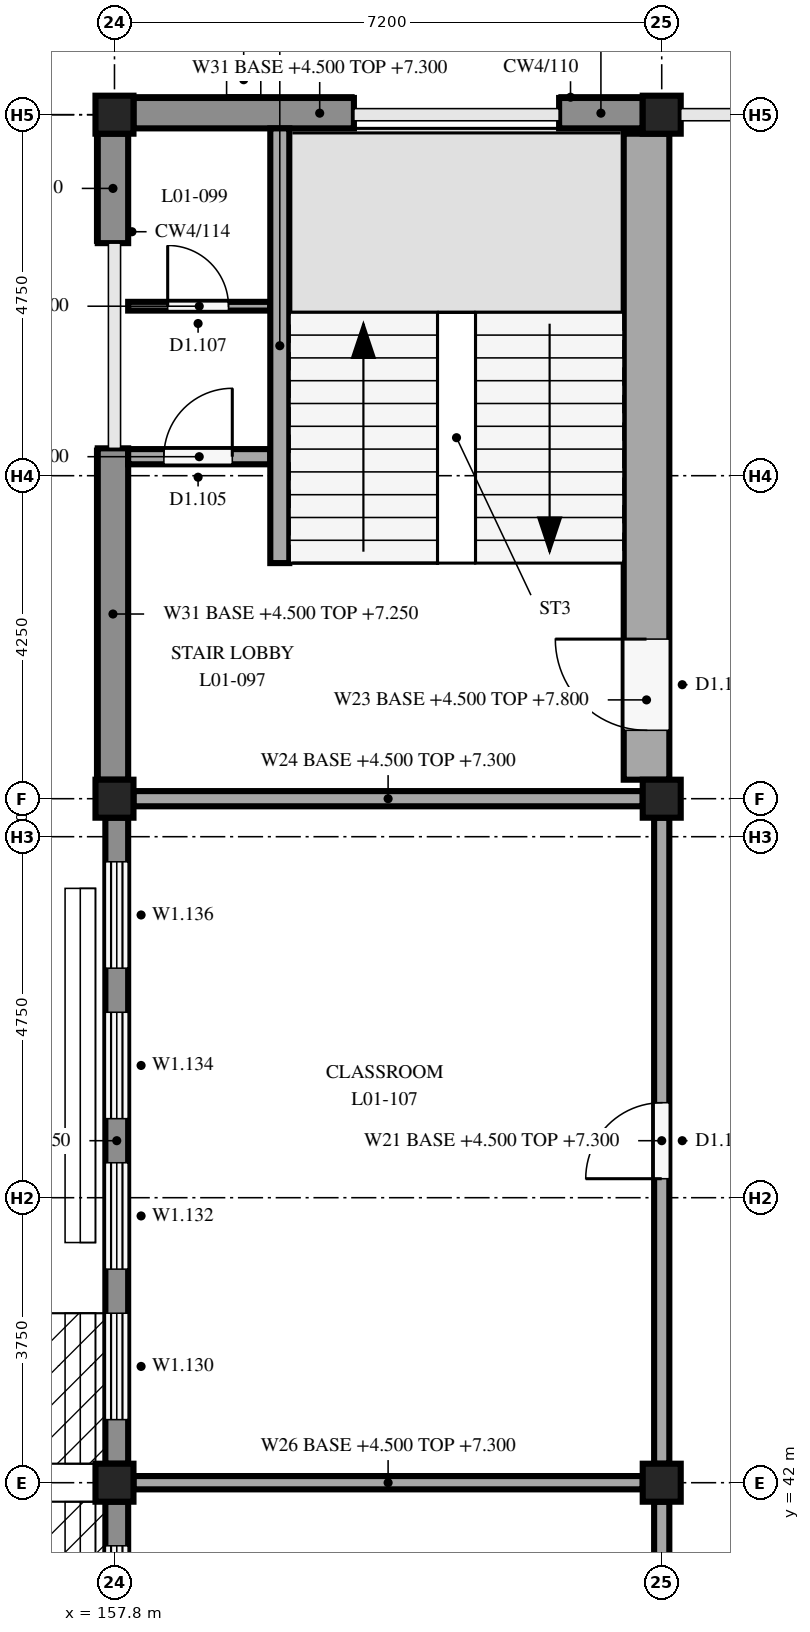
"""IFC4 building model, lengths in metres.
Left out: names, types, materials, properties, quantities, classifications, styles, units other than length and angle.
Written with IfcOpenShell. Run it as: python <this file> out.ifc"""

import sys

from ifc_helpers import new_model, si_unit, direction, frame, frame_2d, origin, origin_2d, place, context, subcontext, project, spatial, rectangle, extrude, element, fill, save


model = new_model("IFC4")
c1 = context("Model", 3, precision=1e-05, world=origin(), true_north=direction((0.0, 1.0)))
c2 = subcontext(c1, "Body", "Model", "MODEL_VIEW")
j1 = project(units=[si_unit("LENGTHUNIT", "METRE"), si_unit("PLANEANGLEUNIT", "RADIAN")], contexts=[c1])
p1 = place(None, origin())
s1 = spatial("IfcSite", under=j1, at=p1, CompositionType="ELEMENT")
p2 = place(p1, origin())
s2 = spatial("IfcBuilding", under=s1, at=p2, CompositionType="ELEMENT")
p3 = place(p2, frame((0.0, 0.0, 4.5)))
s3 = spatial("IfcBuildingStorey", under=s2, at=p3, CompositionType="ELEMENT", Elevation=4.5)
for number, where, z_axis, x_axis in (
    (1, (157.8, 42.0, 0.0), (0.0, 0.0, 1.0), (1.0, 0.0, 0.0)),
    (2, (157.8, 51.0, 0.0), (0.0, 0.0, 1.0), (1.0, 0.0, 0.0)),
    (3, (157.8, 60.0, 0.0), (0.0, 0.0, 1.0), (1.0, 0.0, 0.0)),
    (4, (165.0, 42.0, 0.0), (0.0, 0.0, 1.0), (1.0, 0.0, 0.0)),
    (5, (165.0, 51.0, 0.0), (0.0, 0.0, 1.0), (1.0, 0.0, 0.0)),
    (6, (165.0, 60.0, 0.0), (0.0, 0.0, 1.0), (1.0, 0.0, 0.0)),
):
    element("IfcColumn", number, at=place(p3, frame(where, z_axis=z_axis, x_axis=x_axis)), inside=s3, PredefinedType="COLUMN", context=c2, shape_type="SweptSolid", body=[
        extrude(rectangle(XDim=0.5, YDim=0.5, at=origin_2d()), origin(), (0.0, 0.0, 1.0), 3.3),
    ])
p4 = place(p3, frame((157.83, 33.25, 0.0), z_axis=(0.0, 0.0, 1.0), x_axis=(0.0, 1.0, 0.0)))
e7 = element("IfcWall", 7, at=p4, inside=s3, PredefinedType="STANDARD", context=c2, shape_type="SweptSolid", body=[
    extrude(rectangle(XDim=8.5, YDim=0.3, at=frame_2d((4.25, 0.0))), origin(), (0.0, 0.0, 1.0), 2.75),
])
p5 = place(p4, frame((0.58, 0.0, 0.6)))
e8 = element("IfcOpeningElement", 8, at=p5, cuts=e7, PredefinedType="OPENING", context=c2, shape_type="SweptSolid", body=[
    extrude(rectangle(XDim=1.4, YDim=2.1, at=frame_2d((0.7, 1.05))), frame((0.0, 0.16, 0.0), z_axis=(0.0, -1.0, 0.0), x_axis=(1.0, 0.0, 0.0)), (0.0, 0.0, 1.0), 0.32),
])
p6 = place(p4, frame((2.56, 0.0, 0.6)))
e9 = element("IfcOpeningElement", 9, at=p6, cuts=e7, PredefinedType="OPENING", context=c2, shape_type="SweptSolid", body=[
    extrude(rectangle(XDim=1.4, YDim=2.1, at=frame_2d((0.7, 1.05))), frame((0.0, 0.16, 0.0), z_axis=(0.0, -1.0, 0.0), x_axis=(1.0, 0.0, 0.0)), (0.0, 0.0, 1.0), 0.32),
])
p7 = place(p4, frame((4.54, 0.0, 0.6)))
e10 = element("IfcOpeningElement", 10, at=p7, cuts=e7, PredefinedType="OPENING", context=c2, shape_type="SweptSolid", body=[
    extrude(rectangle(XDim=1.4, YDim=2.1, at=frame_2d((0.7, 1.05))), frame((0.0, 0.16, 0.0), z_axis=(0.0, -1.0, 0.0), x_axis=(1.0, 0.0, 0.0)), (0.0, 0.0, 1.0), 0.32),
])
p8 = place(p4, frame((6.52, 0.0, 0.6)))
e11 = element("IfcOpeningElement", 11, at=p8, cuts=e7, PredefinedType="OPENING", context=c2, shape_type="SweptSolid", body=[
    extrude(rectangle(XDim=1.4, YDim=2.1, at=frame_2d((0.7, 1.05))), frame((0.0, 0.16, 0.0), z_axis=(0.0, -1.0, 0.0), x_axis=(1.0, 0.0, 0.0)), (0.0, 0.0, 1.0), 0.32),
])
p9 = place(p3, frame((157.83, 42.25, 0.0), z_axis=(0.0, 0.0, 1.0), x_axis=(0.0, 1.0, 0.0)))
e12 = element("IfcWall", 12, at=p9, inside=s3, PredefinedType="STANDARD", context=c2, shape_type="SweptSolid", body=[
    extrude(rectangle(XDim=8.5, YDim=0.3, at=frame_2d((4.25, 0.0))), origin(), (0.0, 0.0, 1.0), 2.75),
])
p10 = place(p9, frame((0.58, 0.0, 0.6)))
e13 = element("IfcOpeningElement", 13, at=p10, cuts=e12, PredefinedType="OPENING", context=c2, shape_type="SweptSolid", body=[
    extrude(rectangle(XDim=1.4, YDim=2.1, at=frame_2d((0.7, 1.05))), frame((0.0, 0.16, 0.0), z_axis=(0.0, -1.0, 0.0), x_axis=(1.0, 0.0, 0.0)), (0.0, 0.0, 1.0), 0.32),
])
p11 = place(p9, frame((2.56, 0.0, 0.6)))
e14 = element("IfcOpeningElement", 14, at=p11, cuts=e12, PredefinedType="OPENING", context=c2, shape_type="SweptSolid", body=[
    extrude(rectangle(XDim=1.4, YDim=2.1, at=frame_2d((0.7, 1.05))), frame((0.0, 0.16, 0.0), z_axis=(0.0, -1.0, 0.0), x_axis=(1.0, 0.0, 0.0)), (0.0, 0.0, 1.0), 0.32),
])
p12 = place(p9, frame((4.54, 0.0, 0.6)))
e15 = element("IfcOpeningElement", 15, at=p12, cuts=e12, PredefinedType="OPENING", context=c2, shape_type="SweptSolid", body=[
    extrude(rectangle(XDim=1.4, YDim=2.1, at=frame_2d((0.7, 1.05))), frame((0.0, 0.16, 0.0), z_axis=(0.0, -1.0, 0.0), x_axis=(1.0, 0.0, 0.0)), (0.0, 0.0, 1.0), 0.32),
])
p13 = place(p9, frame((6.52, 0.0, 0.6)))
e16 = element("IfcOpeningElement", 16, at=p13, cuts=e12, PredefinedType="OPENING", context=c2, shape_type="SweptSolid", body=[
    extrude(rectangle(XDim=1.4, YDim=2.1, at=frame_2d((0.7, 1.05))), frame((0.0, 0.16, 0.0), z_axis=(0.0, -1.0, 0.0), x_axis=(1.0, 0.0, 0.0)), (0.0, 0.0, 1.0), 0.32),
])
p14 = place(p3, frame((157.78, 51.25, 0.0), z_axis=(0.0, 0.0, 1.0), x_axis=(0.0, 1.0, 0.0)))
e17 = element("IfcWall", 17, at=p14, inside=s3, PredefinedType="STANDARD", context=c2, shape_type="SweptSolid", body=[
    extrude(rectangle(XDim=4.36, YDim=0.4, at=frame_2d((2.18, 0.0))), origin(), (0.0, 0.0, 1.0), 2.75),
])
p15 = place(p3, frame((157.78, 58.31, 0.0), z_axis=(0.0, 0.0, 1.0), x_axis=(0.0, 1.0, 0.0)))
e18 = element("IfcWall", 18, at=p15, inside=s3, PredefinedType="STANDARD", context=c2, shape_type="SweptSolid", body=[
    extrude(rectangle(XDim=1.44, YDim=0.4, at=frame_2d((0.72, 0.0))), origin(), (0.0, 0.0, 1.0), 2.75),
])
p16 = place(p3, frame((158.05, 60.02, 0.0), z_axis=(0.0, 0.0, 1.0), x_axis=(1.0, 0.0, 0.0)))
e19 = element("IfcWall", 19, at=p16, inside=s3, PredefinedType="STANDARD", context=c2, shape_type="SweptSolid", body=[
    extrude(rectangle(XDim=2.9, YDim=0.4, at=frame_2d((1.45, 0.0))), origin(), (0.0, 0.0, 1.0), 2.8),
])
p17 = place(p3, frame((163.65, 60.02, 0.0), z_axis=(0.0, 0.0, 1.0), x_axis=(1.0, 0.0, 0.0)))
e20 = element("IfcWall", 20, at=p17, inside=s3, PredefinedType="STANDARD", context=c2, shape_type="SweptSolid", body=[
    extrude(rectangle(XDim=1.1, YDim=0.4, at=frame_2d((0.55, 0.0))), origin(), (0.0, 0.0, 1.0), 2.8),
])
p18 = place(p3, frame((159.975, 54.1, 0.0), z_axis=(0.0, 0.0, 1.0), x_axis=(0.0, 1.0, 0.0)))
e21 = element("IfcWall", 21, at=p18, inside=s3, PredefinedType="SOLIDWALL", context=c2, shape_type="SweptSolid", body=[
    extrude(rectangle(XDim=5.72, YDim=0.25, at=frame_2d((2.86, 0.0))), origin(), (0.0, 0.0, 1.0), 3.3),
])
p19 = place(p3, frame((164.8, 51.25, 0.0), z_axis=(0.0, 0.0, 1.0), x_axis=(0.0, 1.0, 0.0)))
e22 = element("IfcWall", 22, at=p19, inside=s3, PredefinedType="SOLIDWALL", context=c2, shape_type="SweptSolid", body=[
    extrude(rectangle(XDim=8.5, YDim=0.6, at=frame_2d((4.25, 0.0))), origin(), (0.0, 0.0, 1.0), 3.3),
])
p20 = place(p19, frame((0.65, 0.0, 0.0)))
e23 = element("IfcOpeningElement", 23, at=p20, cuts=e22, PredefinedType="OPENING", context=c2, shape_type="SweptSolid", body=[
    extrude(rectangle(XDim=1.2, YDim=2.1, at=frame_2d((0.6, 1.05))), frame((0.0, 0.31, 0.0), z_axis=(0.0, -1.0, 0.0), x_axis=(1.0, 0.0, 0.0)), (0.0, 0.0, 1.0), 0.62),
])
p21 = place(p3, frame((157.98, 55.5, 0.0), z_axis=(0.0, 0.0, 1.0), x_axis=(1.0, 0.0, 0.0)))
e24 = element("IfcWall", 24, at=p21, inside=s3, PredefinedType="SOLIDWALL", context=c2, shape_type="SweptSolid", body=[
    extrude(rectangle(XDim=1.87, YDim=0.2, at=frame_2d((0.935, 0.0))), origin(), (0.0, 0.0, 1.0), 3.3),
])
p22 = place(p21, frame((0.47, 0.0, 0.0)))
e25 = element("IfcOpeningElement", 25, at=p22, cuts=e24, PredefinedType="OPENING", context=c2, shape_type="SweptSolid", body=[
    extrude(rectangle(XDim=0.9, YDim=2.1, at=frame_2d((0.45, 1.05))), frame((0.0, 0.11, 0.0), z_axis=(0.0, -1.0, 0.0), x_axis=(1.0, 0.0, 0.0)), (0.0, 0.0, 1.0), 0.22),
])
p23 = place(p3, frame((157.98, 57.48, 0.0), z_axis=(0.0, 0.0, 1.0), x_axis=(1.0, 0.0, 0.0)))
e26 = element("IfcWall", 26, at=p23, inside=s3, PredefinedType="PARTITIONING", context=c2, shape_type="SweptSolid", body=[
    extrude(rectangle(XDim=1.87, YDim=0.115, at=frame_2d((0.935, 0.0))), origin(), (0.0, 0.0, 1.0), 3.3),
])
p24 = place(p23, frame((0.52, 0.0, 0.0)))
e27 = element("IfcOpeningElement", 27, at=p24, cuts=e26, PredefinedType="OPENING", context=c2, shape_type="SweptSolid", body=[
    extrude(rectangle(XDim=0.8, YDim=2.1, at=frame_2d((0.4, 1.05))), frame((0.0, 0.067, 0.0), z_axis=(0.0, -1.0, 0.0), x_axis=(1.0, 0.0, 0.0)), (0.0, 0.0, 1.0), 0.135),
])
p25 = place(p3, frame((158.05, 51.0, 0.0), z_axis=(0.0, 0.0, 1.0), x_axis=(1.0, 0.0, 0.0)))
e28 = element("IfcWall", 28, at=p25, inside=s3, PredefinedType="SOLIDWALL", context=c2, shape_type="SweptSolid", body=[
    extrude(rectangle(XDim=6.7, YDim=0.2, at=frame_2d((3.35, 0.0))), origin(), (0.0, 0.0, 1.0), 2.8),
])
p26 = place(p3, frame((165.0, 33.25, 0.0), z_axis=(0.0, 0.0, 1.0), x_axis=(0.0, 1.0, 0.0)))
e29 = element("IfcWall", 29, at=p26, inside=s3, PredefinedType="PARTITIONING", context=c2, shape_type="SweptSolid", body=[
    extrude(rectangle(XDim=8.5, YDim=0.2, at=frame_2d((4.25, 0.0))), origin(), (0.0, 0.0, 1.0), 2.8),
])
p27 = place(p26, frame((3.75, 0.0, 0.0)))
e30 = element("IfcOpeningElement", 30, at=p27, cuts=e29, PredefinedType="OPENING", context=c2, shape_type="SweptSolid", body=[
    extrude(rectangle(XDim=1.0, YDim=2.1, at=frame_2d((0.5, 1.05))), frame((0.0, 0.11, 0.0), z_axis=(0.0, -1.0, 0.0), x_axis=(1.0, 0.0, 0.0)), (0.0, 0.0, 1.0), 0.22),
])
p28 = place(p3, frame((165.0, 42.25, 0.0), z_axis=(0.0, 0.0, 1.0), x_axis=(0.0, 1.0, 0.0)))
e31 = element("IfcWall", 31, at=p28, inside=s3, PredefinedType="PARTITIONING", context=c2, shape_type="SweptSolid", body=[
    extrude(rectangle(XDim=8.5, YDim=0.2, at=frame_2d((4.25, 0.0))), origin(), (0.0, 0.0, 1.0), 2.8),
])
p29 = place(p28, frame((3.75, 0.0, 0.0)))
e32 = element("IfcOpeningElement", 32, at=p29, cuts=e31, PredefinedType="OPENING", context=c2, shape_type="SweptSolid", body=[
    extrude(rectangle(XDim=1.0, YDim=2.1, at=frame_2d((0.5, 1.05))), frame((0.0, 0.11, 0.0), z_axis=(0.0, -1.0, 0.0), x_axis=(1.0, 0.0, 0.0)), (0.0, 0.0, 1.0), 0.22),
])
p30 = place(p3, frame((158.05, 42.0, 0.0), z_axis=(0.0, 0.0, 1.0), x_axis=(1.0, 0.0, 0.0)))
e33 = element("IfcWall", 33, at=p30, inside=s3, PredefinedType="PARTITIONING", context=c2, shape_type="SweptSolid", body=[
    extrude(rectangle(XDim=6.7, YDim=0.175, at=frame_2d((3.35, 0.0))), origin(), (0.0, 0.0, 1.0), 2.8),
])
p31 = place(p8, origin())
e34 = element("IfcWindow", 34, at=p31, inside=s3, PartitioningType="DOUBLE_PANEL_VERTICAL", PredefinedType="WINDOW", context=c2, shape_type="SweptSolid", body=[
    extrude(rectangle(XDim=1.4, YDim=2.1, at=frame_2d((0.7, 1.05))), frame((0.0, 0.03, 0.0), z_axis=(0.0, -1.0, 0.0), x_axis=(1.0, 0.0, 0.0)), (0.0, 0.0, 1.0), 0.06),
])
fill(e11, e34)
p32 = place(p10, origin())
e35 = element("IfcWindow", 35, at=p32, inside=s3, PartitioningType="DOUBLE_PANEL_VERTICAL", PredefinedType="WINDOW", context=c2, shape_type="SweptSolid", body=[
    extrude(rectangle(XDim=1.4, YDim=2.1, at=frame_2d((0.7, 1.05))), frame((0.0, 0.03, 0.0), z_axis=(0.0, -1.0, 0.0), x_axis=(1.0, 0.0, 0.0)), (0.0, 0.0, 1.0), 0.06),
])
fill(e13, e35)
p33 = place(p11, origin())
e36 = element("IfcWindow", 36, at=p33, inside=s3, PartitioningType="DOUBLE_PANEL_VERTICAL", PredefinedType="WINDOW", context=c2, shape_type="SweptSolid", body=[
    extrude(rectangle(XDim=1.4, YDim=2.1, at=frame_2d((0.7, 1.05))), frame((0.0, 0.03, 0.0), z_axis=(0.0, -1.0, 0.0), x_axis=(1.0, 0.0, 0.0)), (0.0, 0.0, 1.0), 0.06),
])
fill(e14, e36)
p34 = place(p12, origin())
e37 = element("IfcWindow", 37, at=p34, inside=s3, PartitioningType="DOUBLE_PANEL_VERTICAL", PredefinedType="WINDOW", context=c2, shape_type="SweptSolid", body=[
    extrude(rectangle(XDim=1.4, YDim=2.1, at=frame_2d((0.7, 1.05))), frame((0.0, 0.03, 0.0), z_axis=(0.0, -1.0, 0.0), x_axis=(1.0, 0.0, 0.0)), (0.0, 0.0, 1.0), 0.06),
])
fill(e15, e37)
p35 = place(p13, origin())
e38 = element("IfcWindow", 38, at=p35, inside=s3, PartitioningType="DOUBLE_PANEL_VERTICAL", PredefinedType="WINDOW", context=c2, shape_type="SweptSolid", body=[
    extrude(rectangle(XDim=1.4, YDim=2.1, at=frame_2d((0.7, 1.05))), frame((0.0, 0.03, 0.0), z_axis=(0.0, -1.0, 0.0), x_axis=(1.0, 0.0, 0.0)), (0.0, 0.0, 1.0), 0.06),
])
fill(e16, e38)
p36 = place(p20, origin())
e39 = element("IfcDoor", 39, at=p36, inside=s3, OperationType="SINGLE_SWING_RIGHT", PredefinedType="DOOR", context=c2, shape_type="SweptSolid", body=[
    extrude(rectangle(XDim=1.2, YDim=2.1, at=frame_2d((0.6, 1.05))), frame((0.0, 0.025, 0.0), z_axis=(0.0, -1.0, 0.0), x_axis=(1.0, 0.0, 0.0)), (0.0, 0.0, 1.0), 0.05),
])
fill(e23, e39)
p37 = place(p22, origin())
e40 = element("IfcDoor", 40, at=p37, inside=s3, OperationType="SINGLE_SWING_RIGHT", PredefinedType="DOOR", context=c2, shape_type="SweptSolid", body=[
    extrude(rectangle(XDim=0.9, YDim=2.1, at=frame_2d((0.45, 1.05))), frame((0.0, 0.025, 0.0), z_axis=(0.0, -1.0, 0.0), x_axis=(1.0, 0.0, 0.0)), (0.0, 0.0, 1.0), 0.05),
])
fill(e25, e40)
p38 = place(p24, origin())
e41 = element("IfcDoor", 41, at=p38, inside=s3, OperationType="SINGLE_SWING_LEFT", PredefinedType="DOOR", context=c2, shape_type="SweptSolid", body=[
    extrude(rectangle(XDim=0.8, YDim=2.1, at=frame_2d((0.4, 1.05))), frame((0.0, 0.025, 0.0), z_axis=(0.0, -1.0, 0.0), x_axis=(1.0, 0.0, 0.0)), (0.0, 0.0, 1.0), 0.05),
])
fill(e27, e41)
p39 = place(p29, origin())
e42 = element("IfcDoor", 42, at=p39, inside=s3, OperationType="SINGLE_SWING_LEFT", PredefinedType="DOOR", context=c2, shape_type="SweptSolid", body=[
    extrude(rectangle(XDim=1.0, YDim=2.1, at=frame_2d((0.5, 1.05))), frame((0.0, 0.025, 0.0), z_axis=(0.0, -1.0, 0.0), x_axis=(1.0, 0.0, 0.0)), (0.0, 0.0, 1.0), 0.05),
])
fill(e32, e42)
save(model, sys.argv[1])
